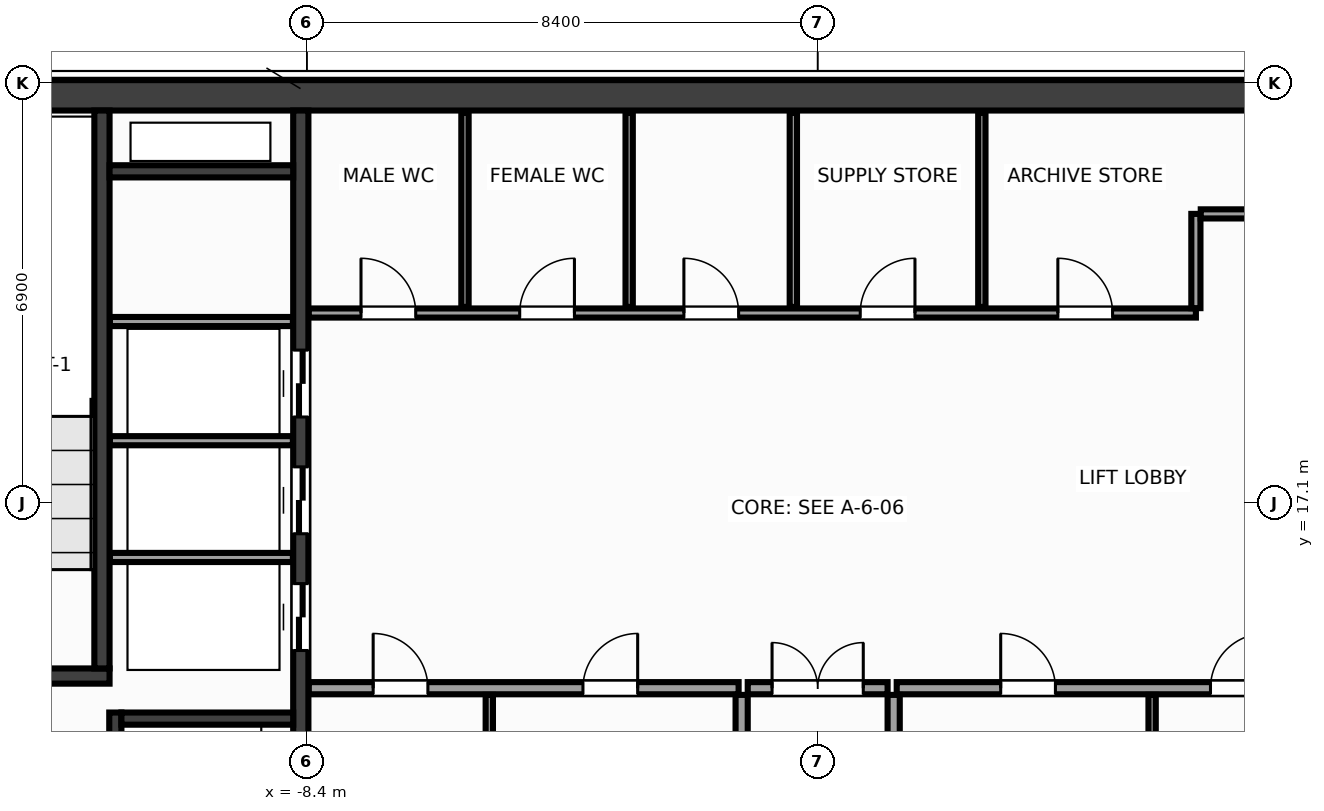
"""IFC4 building model, lengths in metres.
Left out: names, types, materials, properties, quantities, classifications, styles, units other than length and angle.
Written with IfcOpenShell. Run it as: python <this file> out.ifc"""

import sys

from ifc_helpers import new_model, si_unit, direction, frame, frame_2d, origin, place, context, subcontext, project, spatial, rectangle, extrude, source, transform, mapped, element, fill, save


model = new_model("IFC4")
c1 = context("Model", 3, precision=1e-05, world=origin(), true_north=direction((0.0, 1.0)))
c2 = subcontext(c1, "Body", "Model", "MODEL_VIEW")
j1 = project(units=[si_unit("LENGTHUNIT", "METRE"), si_unit("PLANEANGLEUNIT", "RADIAN")], contexts=[c1])
p1 = place(None, origin())
s1 = spatial("IfcSite", under=j1, at=p1, CompositionType="ELEMENT")
p2 = place(p1, origin())
s2 = spatial("IfcBuilding", under=s1, at=p2, CompositionType="ELEMENT")
p3 = place(p2, frame((0.0, 0.0, 286.4)))
s3 = spatial("IfcBuildingStorey", under=s2, at=p3, CompositionType="ELEMENT", Elevation=286.4)
m1 = source(origin(), c2, "Body", "SweptSolid", [
    extrude(rectangle(XDim=31.7, YDim=0.5, at=frame_2d((15.85, 0.0))), origin(), (0.0, 0.0, 1.0), 3.6),
])
p4 = place(p3, frame((-15.85, 23.8, 0.0), z_axis=(0.0, 0.0, 1.0), x_axis=(1.0, 0.0, 0.0)))
e1 = element("IfcWall", 1, at=p4, inside=s3, PredefinedType="SHEAR", context=c2, shape_type="MappedRepresentation", body=[
    mapped(m1, transform((0.0, 0.0, 0.0), x_axis=(1.0, 0.0, 0.0), y_axis=(0.0, 1.0, 0.0), z_axis=(0.0, 0.0, 1.0), scale=1.0)),
])
m2 = source(origin(), c2, "Body", "SweptSolid", [
    extrude(rectangle(XDim=13.1, YDim=0.25, at=frame_2d((6.55, 0.0))), origin(), (0.0, 0.0, 1.0), 3.6),
])
p5 = place(p3, frame((-8.5, 10.45, 0.0), z_axis=(0.0, 0.0, 1.0), x_axis=(0.0, 1.0, 0.0)))
e2 = element("IfcWall", 2, at=p5, inside=s3, PredefinedType="SHEAR", context=c2, shape_type="MappedRepresentation", body=[
    mapped(m2, transform((0.0, 0.0, 0.0), x_axis=(1.0, 0.0, 0.0), y_axis=(0.0, 1.0, 0.0), z_axis=(0.0, 0.0, 1.0), scale=1.0)),
])
p6 = place(p5, frame((4.22, 0.0, 0.0)))
e3 = element("IfcOpeningElement", 3, at=p6, cuts=e2, PredefinedType="OPENING", context=c2, shape_type="SweptSolid", body=[
    extrude(rectangle(XDim=1.1, YDim=2.15, at=frame_2d((0.55, 1.075))), frame((0.0, 0.137, 0.0), z_axis=(0.0, -1.0, 0.0), x_axis=(1.0, 0.0, 0.0)), (0.0, 0.0, 1.0), 0.274),
])
p7 = place(p5, frame((6.14, 0.0, 0.0)))
e4 = element("IfcOpeningElement", 4, at=p7, cuts=e2, PredefinedType="OPENING", context=c2, shape_type="SweptSolid", body=[
    extrude(rectangle(XDim=1.1, YDim=2.15, at=frame_2d((0.55, 1.075))), frame((0.0, 0.137, 0.0), z_axis=(0.0, -1.0, 0.0), x_axis=(1.0, 0.0, 0.0)), (0.0, 0.0, 1.0), 0.274),
])
p8 = place(p5, frame((8.06, 0.0, 0.0)))
e5 = element("IfcOpeningElement", 5, at=p8, cuts=e2, PredefinedType="OPENING", context=c2, shape_type="SweptSolid", body=[
    extrude(rectangle(XDim=1.1, YDim=2.15, at=frame_2d((0.55, 1.075))), frame((0.0, 0.137, 0.0), z_axis=(0.0, -1.0, 0.0), x_axis=(1.0, 0.0, 0.0)), (0.0, 0.0, 1.0), 0.274),
])
m3 = source(origin(), c2, "Body", "SweptSolid", [
    extrude(rectangle(XDim=3.705, YDim=0.25, at=frame_2d((1.853, 0.0))), origin(), (0.0, 0.0, 1.0), 3.6),
])
p9 = place(p3, frame((-15.35, 14.25, 0.0), z_axis=(0.0, 0.0, 1.0), x_axis=(1.0, 0.0, 0.0)))
e6 = element("IfcWall", 6, at=p9, inside=s3, PredefinedType="SHEAR", context=c2, shape_type="MappedRepresentation", body=[
    mapped(m3, transform((0.0, 0.0, 0.0), x_axis=(1.0, 0.0, 0.0), y_axis=(0.0, 1.0, 0.0), z_axis=(0.0, 0.0, 1.0), scale=1.0)),
])
p10 = place(p9, frame((0.95, 0.0, 0.0)))
e7 = element("IfcOpeningElement", 7, at=p10, cuts=e6, PredefinedType="OPENING", context=c2, shape_type="SweptSolid", body=[
    extrude(rectangle(XDim=1.6, YDim=2.15, at=frame_2d((0.8, 1.075))), frame((0.0, 0.137, 0.0), z_axis=(0.0, -1.0, 0.0), x_axis=(1.0, 0.0, 0.0)), (0.0, 0.0, 1.0), 0.274),
])
m4 = source(origin(), c2, "Body", "SweptSolid", [
    extrude(rectangle(XDim=9.175, YDim=0.25, at=frame_2d((4.587, 0.0))), origin(), (0.0, 0.0, 1.0), 3.6),
])
p11 = place(p3, frame((-11.77, 14.375, 0.0), z_axis=(0.0, 0.0, 1.0), x_axis=(0.0, 1.0, 0.0)))
e8 = element("IfcWall", 8, at=p11, inside=s3, PredefinedType="SHEAR", context=c2, shape_type="MappedRepresentation", body=[
    mapped(m4, transform((0.0, 0.0, 0.0), x_axis=(1.0, 0.0, 0.0), y_axis=(0.0, 1.0, 0.0), z_axis=(0.0, 0.0, 1.0), scale=1.0)),
])
m5 = source(origin(), c2, "Body", "SweptSolid", [
    extrude(rectangle(XDim=3.2, YDim=0.2, at=frame_2d((1.6, 0.0))), origin(), (0.0, 0.0, 1.0), 3.6),
])
p12 = place(p3, frame((-11.55, 10.45, 0.0), z_axis=(0.0, 0.0, 1.0), x_axis=(0.0, 1.0, 0.0)))
e9 = element("IfcWall", 9, at=p12, inside=s3, PredefinedType="SHEAR", context=c2, shape_type="MappedRepresentation", body=[
    mapped(m5, transform((0.0, 0.0, 0.0), x_axis=(1.0, 0.0, 0.0), y_axis=(0.0, 1.0, 0.0), z_axis=(0.0, 0.0, 1.0), scale=1.0)),
])
p13 = place(p12, frame((0.9, 0.0, 0.0)))
e10 = element("IfcOpeningElement", 10, at=p13, cuts=e9, PredefinedType="OPENING", context=c2, shape_type="SweptSolid", body=[
    extrude(rectangle(XDim=1.1, YDim=2.15, at=frame_2d((0.55, 1.075))), frame((0.0, 0.112, 0.0), z_axis=(0.0, -1.0, 0.0), x_axis=(1.0, 0.0, 0.0)), (0.0, 0.0, 1.0), 0.224),
])
m6 = source(origin(), c2, "Body", "SweptSolid", [
    extrude(rectangle(XDim=2.825, YDim=0.2, at=frame_2d((1.413, 0.0))), origin(), (0.0, 0.0, 1.0), 3.6),
])
p14 = place(p3, frame((-11.45, 13.55, 0.0), z_axis=(0.0, 0.0, 1.0), x_axis=(1.0, 0.0, 0.0)))
e11 = element("IfcWall", 11, at=p14, inside=s3, PredefinedType="SHEAR", context=c2, shape_type="MappedRepresentation", body=[
    mapped(m6, transform((0.0, 0.0, 0.0), x_axis=(1.0, 0.0, 0.0), y_axis=(0.0, 1.0, 0.0), z_axis=(0.0, 0.0, 1.0), scale=1.0)),
])
m7 = source(origin(), c2, "Body", "SweptSolid", [
    extrude(rectangle(XDim=3.02, YDim=0.2, at=frame_2d((1.51, 0.0))), origin(), (0.0, 0.0, 1.0), 3.6),
])
p15 = place(p3, frame((-11.645, 22.55, 0.0), z_axis=(0.0, 0.0, 1.0), x_axis=(1.0, 0.0, 0.0)))
e12 = element("IfcWall", 12, at=p15, inside=s3, PredefinedType="SHEAR", context=c2, shape_type="MappedRepresentation", body=[
    mapped(m7, transform((0.0, 0.0, 0.0), x_axis=(1.0, 0.0, 0.0), y_axis=(0.0, 1.0, 0.0), z_axis=(0.0, 0.0, 1.0), scale=1.0)),
])
m8 = source(origin(), c2, "Body", "SweptSolid", [
    extrude(rectangle(XDim=3.01, YDim=0.15, at=frame_2d((1.505, 0.0))), origin(), (0.0, 0.0, 1.0), 3.37),
])
for number, where, z_axis, x_axis in (
    (13, (-11.64, 16.2, 0.0), (0.0, 0.0, 1.0), (1.0, 0.0, 0.0)),
    (14, (-11.64, 18.12, 0.0), (0.0, 0.0, 1.0), (1.0, 0.0, 0.0)),
    (15, (-11.64, 20.08, 0.0), (0.0, 0.0, 1.0), (1.0, 0.0, 0.0)),
):
    element("IfcWall", number, at=place(p3, frame(where, z_axis=z_axis, x_axis=x_axis)), inside=s3, PredefinedType="PARTITIONING", context=c2, shape_type="MappedRepresentation", body=[
        mapped(m8, transform((0.0, 0.0, 0.0), x_axis=(1.0, 0.0, 0.0), y_axis=(0.0, 1.0, 0.0), z_axis=(0.0, 0.0, 1.0), scale=1.0)),
    ])
m9 = source(origin(), c2, "Body", "SweptSolid", [
    extrude(rectangle(XDim=7.07, YDim=0.2, at=frame_2d((3.535, 0.0))), origin(), (0.0, 0.0, 1.0), 3.37),
])
p16 = place(p3, frame((-8.37, 14.05, 0.0), z_axis=(0.0, 0.0, 1.0), x_axis=(1.0, 0.0, 0.0)))
e16 = element("IfcWall", 16, at=p16, inside=s3, PredefinedType="PARTITIONING", context=c2, shape_type="MappedRepresentation", body=[
    mapped(m9, transform((0.0, 0.0, 0.0), x_axis=(1.0, 0.0, 0.0), y_axis=(0.0, 1.0, 0.0), z_axis=(0.0, 0.0, 1.0), scale=1.0)),
])
p17 = place(p16, frame((1.06, 0.0, 0.0)))
e17 = element("IfcOpeningElement", 17, at=p17, cuts=e16, PredefinedType="OPENING", context=c2, shape_type="SweptSolid", body=[
    extrude(rectangle(XDim=0.9, YDim=2.15, at=frame_2d((0.45, 1.075))), frame((0.0, 0.112, 0.0), z_axis=(0.0, -1.0, 0.0), x_axis=(1.0, 0.0, 0.0)), (0.0, 0.0, 1.0), 0.224),
])
p18 = place(p16, frame((4.51, 0.0, 0.0)))
e18 = element("IfcOpeningElement", 18, at=p18, cuts=e16, PredefinedType="OPENING", context=c2, shape_type="SweptSolid", body=[
    extrude(rectangle(XDim=0.9, YDim=2.15, at=frame_2d((0.45, 1.075))), frame((0.0, 0.112, 0.0), z_axis=(0.0, -1.0, 0.0), x_axis=(1.0, 0.0, 0.0)), (0.0, 0.0, 1.0), 0.224),
])
p19 = place(p3, frame((1.3, 14.05, 0.0), z_axis=(0.0, 0.0, 1.0), x_axis=(1.0, 0.0, 0.0)))
e19 = element("IfcWall", 19, at=p19, inside=s3, PredefinedType="PARTITIONING", context=c2, shape_type="MappedRepresentation", body=[
    mapped(m9, transform((0.0, 0.0, 0.0), x_axis=(1.0, 0.0, 0.0), y_axis=(0.0, 1.0, 0.0), z_axis=(0.0, 0.0, 1.0), scale=1.0)),
])
p20 = place(p19, frame((1.71, 0.0, 0.0)))
e20 = element("IfcOpeningElement", 20, at=p20, cuts=e19, PredefinedType="OPENING", context=c2, shape_type="SweptSolid", body=[
    extrude(rectangle(XDim=0.9, YDim=2.15, at=frame_2d((0.45, 1.075))), frame((0.0, 0.112, 0.0), z_axis=(0.0, -1.0, 0.0), x_axis=(1.0, 0.0, 0.0)), (0.0, 0.0, 1.0), 0.224),
])
p21 = place(p19, frame((5.16, 0.0, 0.0)))
e21 = element("IfcOpeningElement", 21, at=p21, cuts=e19, PredefinedType="OPENING", context=c2, shape_type="SweptSolid", body=[
    extrude(rectangle(XDim=0.9, YDim=2.15, at=frame_2d((0.45, 1.075))), frame((0.0, 0.112, 0.0), z_axis=(0.0, -1.0, 0.0), x_axis=(1.0, 0.0, 0.0)), (0.0, 0.0, 1.0), 0.224),
])
m10 = source(origin(), c2, "Body", "SweptSolid", [
    extrude(rectangle(XDim=3.49, YDim=0.2, at=frame_2d((1.745, 0.0))), origin(), (0.0, 0.0, 1.0), 3.37),
])
for number, where, z_axis, x_axis in (
    (22, (-1.25, 10.45, 0.0), (0.0, 0.0, 1.0), (0.0, 1.0, 0.0)),
    (23, (1.25, 10.45, 0.0), (0.0, 0.0, 1.0), (0.0, 1.0, 0.0)),
):
    element("IfcWall", number, at=place(p3, frame(where, z_axis=z_axis, x_axis=x_axis)), inside=s3, PredefinedType="PARTITIONING", context=c2, shape_type="MappedRepresentation", body=[
        mapped(m10, transform((0.0, 0.0, 0.0), x_axis=(1.0, 0.0, 0.0), y_axis=(0.0, 1.0, 0.0), z_axis=(0.0, 0.0, 1.0), scale=1.0)),
    ])
m11 = source(origin(), c2, "Body", "SweptSolid", [
    extrude(rectangle(XDim=2.3, YDim=0.2, at=frame_2d((1.15, 0.0))), origin(), (0.0, 0.0, 1.0), 3.37),
])
p22 = place(p3, frame((-1.15, 14.05, 0.0), z_axis=(0.0, 0.0, 1.0), x_axis=(1.0, 0.0, 0.0)))
e24 = element("IfcWall", 24, at=p22, inside=s3, PredefinedType="PARTITIONING", context=c2, shape_type="MappedRepresentation", body=[
    mapped(m11, transform((0.0, 0.0, 0.0), x_axis=(1.0, 0.0, 0.0), y_axis=(0.0, 1.0, 0.0), z_axis=(0.0, 0.0, 1.0), scale=1.0)),
])
p23 = place(p22, frame((0.4, 0.0, 0.0)))
e25 = element("IfcOpeningElement", 25, at=p23, cuts=e24, PredefinedType="OPENING", context=c2, shape_type="SweptSolid", body=[
    extrude(rectangle(XDim=1.5, YDim=2.2, at=frame_2d((0.75, 1.1))), frame((0.0, 0.112, 0.0), z_axis=(0.0, -1.0, 0.0), x_axis=(1.0, 0.0, 0.0)), (0.0, 0.0, 1.0), 0.224),
])
m12 = source(origin(), c2, "Body", "SweptSolid", [
    extrude(rectangle(XDim=14.59, YDim=0.15, at=frame_2d((7.295, 0.0))), origin(), (0.0, 0.0, 1.0), 3.37),
])
p24 = place(p3, frame((-8.37, 20.22, 0.0), z_axis=(0.0, 0.0, 1.0), x_axis=(1.0, 0.0, 0.0)))
e26 = element("IfcWall", 26, at=p24, inside=s3, PredefinedType="PARTITIONING", context=c2, shape_type="MappedRepresentation", body=[
    mapped(m12, transform((0.0, 0.0, 0.0), x_axis=(1.0, 0.0, 0.0), y_axis=(0.0, 1.0, 0.0), z_axis=(0.0, 0.0, 1.0), scale=1.0)),
])
p25 = place(p24, frame((0.86, 0.0, 0.0)))
e27 = element("IfcOpeningElement", 27, at=p25, cuts=e26, PredefinedType="OPENING", context=c2, shape_type="SweptSolid", body=[
    extrude(rectangle(XDim=0.9, YDim=2.15, at=frame_2d((0.45, 1.075))), frame((0.0, 0.087, 0.0), z_axis=(0.0, -1.0, 0.0), x_axis=(1.0, 0.0, 0.0)), (0.0, 0.0, 1.0), 0.174),
])
p26 = place(p24, frame((3.47, 0.0, 0.0)))
e28 = element("IfcOpeningElement", 28, at=p26, cuts=e26, PredefinedType="OPENING", context=c2, shape_type="SweptSolid", body=[
    extrude(rectangle(XDim=0.9, YDim=2.15, at=frame_2d((0.45, 1.075))), frame((0.0, 0.087, 0.0), z_axis=(0.0, -1.0, 0.0), x_axis=(1.0, 0.0, 0.0)), (0.0, 0.0, 1.0), 0.174),
])
p27 = place(p24, frame((6.17, 0.0, 0.0)))
e29 = element("IfcOpeningElement", 29, at=p27, cuts=e26, PredefinedType="OPENING", context=c2, shape_type="SweptSolid", body=[
    extrude(rectangle(XDim=0.9, YDim=2.15, at=frame_2d((0.45, 1.075))), frame((0.0, 0.087, 0.0), z_axis=(0.0, -1.0, 0.0), x_axis=(1.0, 0.0, 0.0)), (0.0, 0.0, 1.0), 0.174),
])
p28 = place(p24, frame((9.07, 0.0, 0.0)))
e30 = element("IfcOpeningElement", 30, at=p28, cuts=e26, PredefinedType="OPENING", context=c2, shape_type="SweptSolid", body=[
    extrude(rectangle(XDim=0.9, YDim=2.15, at=frame_2d((0.45, 1.075))), frame((0.0, 0.087, 0.0), z_axis=(0.0, -1.0, 0.0), x_axis=(1.0, 0.0, 0.0)), (0.0, 0.0, 1.0), 0.174),
])
p29 = place(p24, frame((12.32, 0.0, 0.0)))
e31 = element("IfcOpeningElement", 31, at=p29, cuts=e26, PredefinedType="OPENING", context=c2, shape_type="SweptSolid", body=[
    extrude(rectangle(XDim=0.9, YDim=2.15, at=frame_2d((0.45, 1.075))), frame((0.0, 0.087, 0.0), z_axis=(0.0, -1.0, 0.0), x_axis=(1.0, 0.0, 0.0)), (0.0, 0.0, 1.0), 0.174),
])
m13 = source(origin(), c2, "Body", "SweptSolid", [
    extrude(rectangle(XDim=1.55, YDim=0.15, at=frame_2d((0.775, 0.0))), origin(), (0.0, 0.0, 1.0), 3.37),
])
p30 = place(p3, frame((6.22, 20.3, 0.0), z_axis=(0.0, 0.0, 1.0), x_axis=(0.0, 1.0, 0.0)))
e32 = element("IfcWall", 32, at=p30, inside=s3, PredefinedType="PARTITIONING", context=c2, shape_type="MappedRepresentation", body=[
    mapped(m13, transform((0.0, 0.0, 0.0), x_axis=(1.0, 0.0, 0.0), y_axis=(0.0, 1.0, 0.0), z_axis=(0.0, 0.0, 1.0), scale=1.0)),
])
m14 = source(origin(), c2, "Body", "SweptSolid", [
    extrude(rectangle(XDim=2.07, YDim=0.15, at=frame_2d((1.035, 0.0))), origin(), (0.0, 0.0, 1.0), 3.37),
])
p31 = place(p3, frame((6.3, 21.85, 0.0), z_axis=(0.0, 0.0, 1.0), x_axis=(1.0, 0.0, 0.0)))
e33 = element("IfcWall", 33, at=p31, inside=s3, PredefinedType="PARTITIONING", context=c2, shape_type="MappedRepresentation", body=[
    mapped(m14, transform((0.0, 0.0, 0.0), x_axis=(1.0, 0.0, 0.0), y_axis=(0.0, 1.0, 0.0), z_axis=(0.0, 0.0, 1.0), scale=1.0)),
])
m15 = source(origin(), c2, "Body", "SweptSolid", [
    extrude(rectangle(XDim=3.49, YDim=0.12, at=frame_2d((1.745, 0.0))), origin(), (0.0, 0.0, 1.0), 3.37),
])
for number, where, z_axis, x_axis in (
    (34, (-5.4, 10.45, 0.0), (0.0, 0.0, 1.0), (0.0, 1.0, 0.0)),
    (35, (5.5, 10.45, 0.0), (0.0, 0.0, 1.0), (0.0, 1.0, 0.0)),
):
    element("IfcWall", number, at=place(p3, frame(where, z_axis=z_axis, x_axis=x_axis)), inside=s3, PredefinedType="PARTITIONING", context=c2, shape_type="MappedRepresentation", body=[
        mapped(m15, transform((0.0, 0.0, 0.0), x_axis=(1.0, 0.0, 0.0), y_axis=(0.0, 1.0, 0.0), z_axis=(0.0, 0.0, 1.0), scale=1.0)),
    ])
m16 = source(origin(), c2, "Body", "SweptSolid", [
    extrude(rectangle(XDim=3.19, YDim=0.12, at=frame_2d((1.595, 0.0))), origin(), (0.0, 0.0, 1.0), 3.37),
])
for number, where, z_axis, x_axis in (
    (36, (-5.8, 20.32, 0.0), (0.0, 0.0, 1.0), (0.0, 1.0, 0.0)),
    (37, (-3.1, 20.32, 0.0), (0.0, 0.0, 1.0), (0.0, 1.0, 0.0)),
    (38, (-0.4, 20.32, 0.0), (0.0, 0.0, 1.0), (0.0, 1.0, 0.0)),
    (39, (2.7, 20.32, 0.0), (0.0, 0.0, 1.0), (0.0, 1.0, 0.0)),
):
    element("IfcWall", number, at=place(p3, frame(where, z_axis=z_axis, x_axis=x_axis)), inside=s3, PredefinedType="PARTITIONING", context=c2, shape_type="MappedRepresentation", body=[
        mapped(m16, transform((0.0, 0.0, 0.0), x_axis=(1.0, 0.0, 0.0), y_axis=(0.0, 1.0, 0.0), z_axis=(0.0, 0.0, 1.0), scale=1.0)),
    ])
m17 = source(origin(), c2, "Body", "SweptSolid", [
    extrude(rectangle(XDim=1.1, YDim=2.15, at=frame_2d((0.55, 1.075))), frame((0.0, 0.025, 0.0), z_axis=(0.0, -1.0, 0.0), x_axis=(1.0, 0.0, 0.0)), (0.0, 0.0, 1.0), 0.05),
])
p32 = place(p6, origin())
e40 = element("IfcDoor", 40, at=p32, inside=s3, OperationType="DOUBLE_DOOR_SLIDING", PredefinedType="DOOR", context=c2, shape_type="MappedRepresentation", body=[
    mapped(m17, transform((0.0, 0.0, 0.0), x_axis=(1.0, 0.0, 0.0), y_axis=(0.0, 1.0, 0.0), z_axis=(0.0, 0.0, 1.0), scale=1.0)),
])
fill(e3, e40)
p33 = place(p7, origin())
e41 = element("IfcDoor", 41, at=p33, inside=s3, OperationType="DOUBLE_DOOR_SLIDING", PredefinedType="DOOR", context=c2, shape_type="MappedRepresentation", body=[
    mapped(m17, transform((0.0, 0.0, 0.0), x_axis=(1.0, 0.0, 0.0), y_axis=(0.0, 1.0, 0.0), z_axis=(0.0, 0.0, 1.0), scale=1.0)),
])
fill(e4, e41)
p34 = place(p8, origin())
e42 = element("IfcDoor", 42, at=p34, inside=s3, OperationType="DOUBLE_DOOR_SLIDING", PredefinedType="DOOR", context=c2, shape_type="MappedRepresentation", body=[
    mapped(m17, transform((0.0, 0.0, 0.0), x_axis=(1.0, 0.0, 0.0), y_axis=(0.0, 1.0, 0.0), z_axis=(0.0, 0.0, 1.0), scale=1.0)),
])
fill(e5, e42)
m18 = source(origin(), c2, "Body", "SweptSolid", [
    extrude(rectangle(XDim=0.9, YDim=2.15, at=frame_2d((0.45, 1.075))), frame((0.0, 0.025, 0.0), z_axis=(0.0, -1.0, 0.0), x_axis=(1.0, 0.0, 0.0)), (0.0, 0.0, 1.0), 0.05),
])
p35 = place(p17, origin())
e43 = element("IfcDoor", 43, at=p35, inside=s3, OperationType="SINGLE_SWING_LEFT", PredefinedType="DOOR", context=c2, shape_type="MappedRepresentation", body=[
    mapped(m18, transform((0.0, 0.0, 0.0), x_axis=(1.0, 0.0, 0.0), y_axis=(0.0, 1.0, 0.0), z_axis=(0.0, 0.0, 1.0), scale=1.0)),
])
fill(e17, e43)
p36 = place(p18, origin())
e44 = element("IfcDoor", 44, at=p36, inside=s3, OperationType="SINGLE_SWING_RIGHT", PredefinedType="DOOR", context=c2, shape_type="MappedRepresentation", body=[
    mapped(m18, transform((0.0, 0.0, 0.0), x_axis=(1.0, 0.0, 0.0), y_axis=(0.0, 1.0, 0.0), z_axis=(0.0, 0.0, 1.0), scale=1.0)),
])
fill(e18, e44)
p37 = place(p20, origin())
e45 = element("IfcDoor", 45, at=p37, inside=s3, OperationType="SINGLE_SWING_LEFT", PredefinedType="DOOR", context=c2, shape_type="MappedRepresentation", body=[
    mapped(m18, transform((0.0, 0.0, 0.0), x_axis=(1.0, 0.0, 0.0), y_axis=(0.0, 1.0, 0.0), z_axis=(0.0, 0.0, 1.0), scale=1.0)),
])
fill(e20, e45)
p38 = place(p21, origin())
e46 = element("IfcDoor", 46, at=p38, inside=s3, OperationType="SINGLE_SWING_RIGHT", PredefinedType="DOOR", context=c2, shape_type="MappedRepresentation", body=[
    mapped(m18, transform((0.0, 0.0, 0.0), x_axis=(1.0, 0.0, 0.0), y_axis=(0.0, 1.0, 0.0), z_axis=(0.0, 0.0, 1.0), scale=1.0)),
])
fill(e21, e46)
m19 = source(origin(), c2, "Body", "SweptSolid", [
    extrude(rectangle(XDim=1.5, YDim=2.2, at=frame_2d((0.75, 1.1))), frame((0.0, 0.025, 0.0), z_axis=(0.0, -1.0, 0.0), x_axis=(1.0, 0.0, 0.0)), (0.0, 0.0, 1.0), 0.05),
])
p39 = place(p23, origin())
e47 = element("IfcDoor", 47, at=p39, inside=s3, OperationType="DOUBLE_DOOR_SINGLE_SWING", PredefinedType="DOOR", context=c2, shape_type="MappedRepresentation", body=[
    mapped(m19, transform((0.0, 0.0, 0.0), x_axis=(1.0, 0.0, 0.0), y_axis=(0.0, 1.0, 0.0), z_axis=(0.0, 0.0, 1.0), scale=1.0)),
])
fill(e25, e47)
p40 = place(p25, origin())
e48 = element("IfcDoor", 48, at=p40, inside=s3, OperationType="SINGLE_SWING_LEFT", PredefinedType="DOOR", context=c2, shape_type="MappedRepresentation", body=[
    mapped(m18, transform((0.0, 0.0, 0.0), x_axis=(1.0, 0.0, 0.0), y_axis=(0.0, 1.0, 0.0), z_axis=(0.0, 0.0, 1.0), scale=1.0)),
])
fill(e27, e48)
p41 = place(p26, origin())
e49 = element("IfcDoor", 49, at=p41, inside=s3, OperationType="SINGLE_SWING_RIGHT", PredefinedType="DOOR", context=c2, shape_type="MappedRepresentation", body=[
    mapped(m18, transform((0.0, 0.0, 0.0), x_axis=(1.0, 0.0, 0.0), y_axis=(0.0, 1.0, 0.0), z_axis=(0.0, 0.0, 1.0), scale=1.0)),
])
fill(e28, e49)
p42 = place(p27, origin())
e50 = element("IfcDoor", 50, at=p42, inside=s3, OperationType="SINGLE_SWING_LEFT", PredefinedType="DOOR", context=c2, shape_type="MappedRepresentation", body=[
    mapped(m18, transform((0.0, 0.0, 0.0), x_axis=(1.0, 0.0, 0.0), y_axis=(0.0, 1.0, 0.0), z_axis=(0.0, 0.0, 1.0), scale=1.0)),
])
fill(e29, e50)
p43 = place(p28, origin())
e51 = element("IfcDoor", 51, at=p43, inside=s3, OperationType="SINGLE_SWING_RIGHT", PredefinedType="DOOR", context=c2, shape_type="MappedRepresentation", body=[
    mapped(m18, transform((0.0, 0.0, 0.0), x_axis=(1.0, 0.0, 0.0), y_axis=(0.0, 1.0, 0.0), z_axis=(0.0, 0.0, 1.0), scale=1.0)),
])
fill(e30, e51)
p44 = place(p29, origin())
e52 = element("IfcDoor", 52, at=p44, inside=s3, OperationType="SINGLE_SWING_LEFT", PredefinedType="DOOR", context=c2, shape_type="MappedRepresentation", body=[
    mapped(m18, transform((0.0, 0.0, 0.0), x_axis=(1.0, 0.0, 0.0), y_axis=(0.0, 1.0, 0.0), z_axis=(0.0, 0.0, 1.0), scale=1.0)),
])
fill(e31, e52)
save(model, sys.argv[1])
